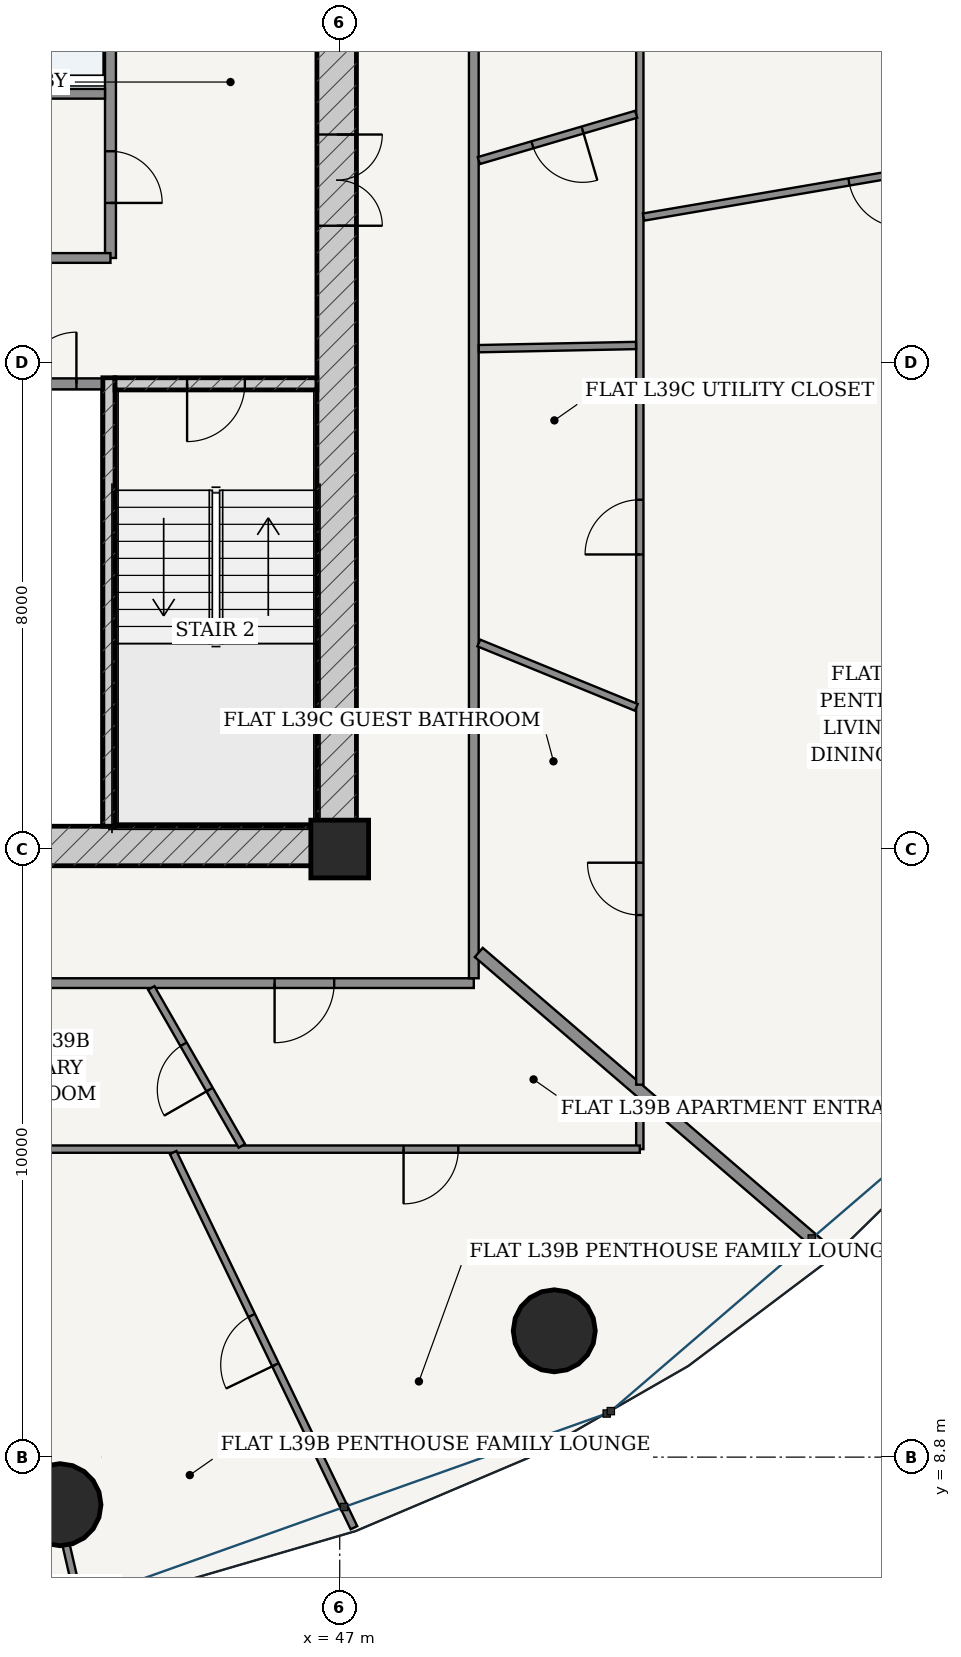
"""IFC4 building model, lengths in metres.
Left out: names, types, materials, properties, quantities, classifications, styles, units other than length and angle.
Written with IfcOpenShell. Run it as: python <this file> out.ifc"""

import sys

from ifc_helpers import new_model, si_unit, direction, frame, frame_2d, origin, origin_2d, place, context, subcontext, project, spatial, rectangle, hollow_circle, extrude, source, transform, mapped, element, fill, save


model = new_model("IFC4")
c1 = context("Model", 3, precision=1e-05, world=origin(), true_north=direction((-0.2419218956, 0.970295726276)))
c2 = subcontext(c1, "Body", "Model", "MODEL_VIEW")
j1 = project(units=[si_unit("LENGTHUNIT", "METRE"), si_unit("PLANEANGLEUNIT", "RADIAN")], contexts=[c1])
p1 = place(None, origin())
s1 = spatial("IfcSite", under=j1, at=p1, CompositionType="ELEMENT")
p2 = place(p1, origin())
s2 = spatial("IfcBuilding", under=s1, at=p2, CompositionType="ELEMENT")
p3 = place(p2, frame((0.0, 0.0, 149.8)))
s3 = spatial("IfcBuildingStorey", under=s2, at=p3, CompositionType="ELEMENT", Elevation=149.8)
p4 = place(p3, frame((47.0, 18.8, 0.0), z_axis=(0.0, 0.0, 1.0), x_axis=(1.0, 0.0, 0.0)))
e1 = element("IfcColumn", 1, at=p4, inside=s3, PredefinedType="COLUMN", context=c2, shape_type="SweptSolid", body=[
    extrude(rectangle(XDim=0.95, YDim=0.95, at=origin_2d()), origin(), (0.0, 0.0, 1.0), 3.6),
])
p5 = place(p3, frame((28.725, 18.85, 0.0), z_axis=(0.0, 0.0, 1.0), x_axis=(1.0, 0.0, 0.0)))
e2 = element("IfcWall", 2, at=p5, inside=s3, PredefinedType="SHEAR", context=c2, shape_type="SweptSolid", body=[
    extrude(rectangle(XDim=18.55, YDim=0.65, at=frame_2d((9.275, 0.0))), origin(), (0.0, 0.0, 1.0), 3.33),
])
p6 = place(p5, frame((7.51, 0.0, 0.0)))
e3 = element("IfcOpeningElement", 3, at=p6, cuts=e2, PredefinedType="OPENING", context=c2, shape_type="SweptSolid", body=[
    extrude(rectangle(XDim=0.85, YDim=2.1, at=frame_2d((0.425, 1.05))), frame((0.0, 0.335, 0.0), z_axis=(0.0, -1.0, 0.0), x_axis=(1.0, 0.0, 0.0)), (0.0, 0.0, 1.0), 0.67),
])
p7 = place(p5, frame((10.59, 0.0, 0.0)))
e4 = element("IfcOpeningElement", 4, at=p7, cuts=e2, PredefinedType="OPENING", context=c2, shape_type="SweptSolid", body=[
    extrude(rectangle(XDim=0.85, YDim=2.1, at=frame_2d((0.425, 1.05))), frame((0.0, 0.335, 0.0), z_axis=(0.0, -1.0, 0.0), x_axis=(1.0, 0.0, 0.0)), (0.0, 0.0, 1.0), 0.67),
])
p8 = place(p3, frame((46.95, 19.175, 0.0), z_axis=(0.0, 0.0, 1.0), x_axis=(0.0, 1.0, 0.0)))
e5 = element("IfcWall", 5, at=p8, inside=s3, PredefinedType="SHEAR", context=c2, shape_type="SweptSolid", body=[
    extrude(rectangle(XDim=15.25, YDim=0.65, at=frame_2d((7.625, 0.0))), origin(), (0.0, 0.0, 1.0), 3.33),
])
p9 = place(p8, frame((9.875, 0.0, 0.0)))
e6 = element("IfcOpeningElement", 6, at=p9, cuts=e5, PredefinedType="OPENING", context=c2, shape_type="SweptSolid", body=[
    extrude(rectangle(XDim=1.5, YDim=2.2, at=frame_2d((0.75, 1.1))), frame((0.0, 0.335, 0.0), z_axis=(0.0, -1.0, 0.0), x_axis=(1.0, 0.0, 0.0)), (0.0, 0.0, 1.0), 0.67),
])
p10 = place(p3, frame((43.205, 19.175, 0.0), z_axis=(0.0, 0.0, 1.0), x_axis=(0.0, 1.0, 0.0)))
e7 = element("IfcWall", 7, at=p10, inside=s3, PredefinedType="SOLIDWALL", context=c2, shape_type="SweptSolid", body=[
    extrude(rectangle(XDim=7.375, YDim=0.2, at=frame_2d((3.688, 0.0))), origin(), (0.0, 0.0, 1.0), 3.33),
])
p11 = place(p3, frame((43.305, 26.45, 0.0), z_axis=(0.0, 0.0, 1.0), x_axis=(1.0, 0.0, 0.0)))
e8 = element("IfcWall", 8, at=p11, inside=s3, PredefinedType="SOLIDWALL", context=c2, shape_type="SweptSolid", body=[
    extrude(rectangle(XDim=3.32, YDim=0.2, at=frame_2d((1.66, 0.0))), origin(), (0.0, 0.0, 1.0), 3.33),
])
p12 = place(p11, frame((1.185, 0.0, 0.0)))
e9 = element("IfcOpeningElement", 9, at=p12, cuts=e8, PredefinedType="OPENING", context=c2, shape_type="SweptSolid", body=[
    extrude(rectangle(XDim=0.95, YDim=2.15, at=frame_2d((0.475, 1.075))), frame((0.0, 0.11, 0.0), z_axis=(0.0, -1.0, 0.0), x_axis=(1.0, 0.0, 0.0)), (0.0, 0.0, 1.0), 0.22),
])
for number, where, z_axis, x_axis in (
    (10, (42.399, 8.018, 0.0), (0.0, 0.0, 1.0), (1.0, 0.0, 0.0)),
    (11, (50.528, 10.877, 0.0), (0.0, 0.0, 1.0), (1.0, 0.0, 0.0)),
):
    element("IfcColumn", number, at=place(p3, frame(where, z_axis=z_axis, x_axis=x_axis)), inside=s3, PredefinedType="COLUMN", context=c2, shape_type="SweptSolid", body=[
        extrude(hollow_circle(Radius=0.675, WallThickness=0.042, at=origin_2d()), origin(), (0.0, 0.0, 1.0), 3.6),
    ])
p13 = place(p3, frame((41.39, 26.45, 0.0), z_axis=(0.0, 0.0, 1.0), x_axis=(1.0, 0.0, 0.0)))
e12 = element("IfcWall", 12, at=p13, inside=s3, PredefinedType="PARTITIONING", context=c2, shape_type="SweptSolid", body=[
    extrude(rectangle(XDim=1.71, YDim=0.18, at=frame_2d((0.855, 0.0))), origin(), (0.0, 0.0, 1.0), 3.33),
])
p14 = place(p13, frame((0.43, 0.0, 0.0)))
e13 = element("IfcOpeningElement", 13, at=p14, cuts=e12, PredefinedType="OPENING", context=c2, shape_type="SweptSolid", body=[
    extrude(rectangle(XDim=0.85, YDim=2.1, at=frame_2d((0.425, 1.05))), frame((0.0, 0.1, 0.0), z_axis=(0.0, -1.0, 0.0), x_axis=(1.0, 0.0, 0.0)), (0.0, 0.0, 1.0), 0.2),
])
p15 = place(p3, frame((43.23, 28.52, 0.0), z_axis=(0.0, 0.0, 1.0), x_axis=(0.0, 1.0, 0.0)))
e14 = element("IfcWall", 14, at=p15, inside=s3, PredefinedType="PARTITIONING", context=c2, shape_type="SweptSolid", body=[
    extrude(rectangle(XDim=5.905, YDim=0.18, at=frame_2d((2.953, 0.0))), origin(), (0.0, 0.0, 1.0), 3.33),
])
p16 = place(p15, frame((0.905, 0.0, 0.0)))
e15 = element("IfcOpeningElement", 15, at=p16, cuts=e14, PredefinedType="OPENING", context=c2, shape_type="SweptSolid", body=[
    extrude(rectangle(XDim=0.85, YDim=2.1, at=frame_2d((0.425, 1.05))), frame((0.0, 0.1, 0.0), z_axis=(0.0, -1.0, 0.0), x_axis=(1.0, 0.0, 0.0)), (0.0, 0.0, 1.0), 0.2),
])
p17 = place(p15, frame((3.655, 0.0, 0.0)))
e16 = element("IfcOpeningElement", 16, at=p17, cuts=e14, PredefinedType="OPENING", context=c2, shape_type="SweptSolid", body=[
    extrude(rectangle(XDim=1.15, YDim=2.2, at=frame_2d((0.575, 1.1))), frame((0.0, 0.1, 0.0), z_axis=(0.0, -1.0, 0.0), x_axis=(1.0, 0.0, 0.0)), (0.0, 0.0, 1.0), 0.2),
])
p18 = place(p3, frame((41.39, 31.22, 0.0), z_axis=(0.0, 0.0, 1.0), x_axis=(1.0, 0.0, 0.0)))
e17 = element("IfcWall", 17, at=p18, inside=s3, PredefinedType="PARTITIONING", context=c2, shape_type="SweptSolid", body=[
    extrude(rectangle(XDim=1.75, YDim=0.16, at=frame_2d((0.875, 0.0))), origin(), (0.0, 0.0, 1.0), 3.33),
])
p19 = place(p3, frame((41.39, 28.52, 0.0), z_axis=(0.0, 0.0, 1.0), x_axis=(1.0, 0.0, 0.0)))
e18 = element("IfcWall", 18, at=p19, inside=s3, PredefinedType="PARTITIONING", context=c2, shape_type="SweptSolid", body=[
    extrude(rectangle(XDim=1.84, YDim=0.16, at=frame_2d((0.92, 0.0))), origin(), (0.0, 0.0, 1.0), 3.33),
])
p20 = place(p3, frame((34.32, 16.595, 0.0), z_axis=(0.0, 0.0, 1.0), x_axis=(1.0, 0.0, 0.0)))
e19 = element("IfcWall", 19, at=p20, inside=s3, PredefinedType="PARTITIONING", context=c2, shape_type="SweptSolid", body=[
    extrude(rectangle(XDim=14.885, YDim=0.16, at=frame_2d((7.442, 0.0))), origin(), (0.0, 0.0, 1.0), 2.776),
])
p21 = place(p20, frame((11.609, 0.0, 0.0)))
e20 = element("IfcOpeningElement", 20, at=p21, cuts=e19, PredefinedType="OPENING", context=c2, shape_type="SweptSolid", body=[
    extrude(rectangle(XDim=0.98, YDim=2.2, at=frame_2d((0.49, 1.1))), frame((0.0, 0.09, 0.0), z_axis=(0.0, -1.0, 0.0), x_axis=(1.0, 0.0, 0.0)), (0.0, 0.0, 1.0), 0.18),
])
p22 = place(p3, frame((49.205, 16.675, 0.0), z_axis=(0.0, 0.0, 1.0), x_axis=(0.0, 1.0, 0.0)))
e21 = element("IfcWall", 21, at=p22, inside=s3, PredefinedType="PARTITIONING", context=c2, shape_type="SweptSolid", body=[
    extrude(rectangle(XDim=18.4, YDim=0.16, at=frame_2d((9.2, 0.0))), origin(), (0.0, 0.0, 1.0), 2.776),
])
p23 = place(p22, frame((15.299, 0.0, 0.0)))
e22 = element("IfcOpeningElement", 22, at=p23, cuts=e21, PredefinedType="OPENING", context=c2, shape_type="SweptSolid", body=[
    extrude(rectangle(XDim=0.98, YDim=2.2, at=frame_2d((0.49, 1.1))), frame((0.0, 0.09, 0.0), z_axis=(0.0, -1.0, 0.0), x_axis=(1.0, 0.0, 0.0)), (0.0, 0.0, 1.0), 0.18),
])
p24 = place(p3, frame((51.935, 14.721, 0.0), z_axis=(0.0, 0.0, 1.0), x_axis=(0.0, -1.0, 0.0)))
e23 = element("IfcWall", 23, at=p24, inside=s3, PredefinedType="PARTITIONING", context=c2, shape_type="SweptSolid", body=[
    extrude(rectangle(XDim=0.856, YDim=0.12, at=frame_2d((0.428, 0.0))), origin(), (0.0, 0.0, 1.0), 3.33),
])
p25 = place(p3, frame((51.935, 13.865, 0.0), z_axis=(0.0, 0.0, 1.0), x_axis=(-1.0, 0.0, 0.0)))
e24 = element("IfcWall", 24, at=p25, inside=s3, PredefinedType="PARTITIONING", context=c2, shape_type="SweptSolid", body=[
    extrude(rectangle(XDim=20.345, YDim=0.12, at=frame_2d((10.172, 0.0))), origin(), (0.0, 0.0, 1.0), 2.776),
])
p26 = place(p25, frame((2.985, 0.0, 0.0)))
e25 = element("IfcOpeningElement", 25, at=p26, cuts=e24, PredefinedType="OPENING", context=c2, shape_type="SweptSolid", body=[
    extrude(rectangle(XDim=0.9, YDim=2.15, at=frame_2d((0.45, 1.075))), frame((0.0, 0.07, 0.0), z_axis=(0.0, -1.0, 0.0), x_axis=(1.0, 0.0, 0.0)), (0.0, 0.0, 1.0), 0.14),
])
p27 = place(p25, frame((12.333, 0.0, 0.0)))
e26 = element("IfcOpeningElement", 26, at=p27, cuts=e24, PredefinedType="OPENING", context=c2, shape_type="SweptSolid", body=[
    extrude(rectangle(XDim=0.9, YDim=2.15, at=frame_2d((0.45, 1.075))), frame((0.0, 0.07, 0.0), z_axis=(0.0, -1.0, 0.0), x_axis=(1.0, 0.0, 0.0)), (0.0, 0.0, 1.0), 0.14),
])
p28 = place(p25, frame((18.436, 0.0, 0.0)))
e27 = element("IfcOpeningElement", 27, at=p28, cuts=e24, PredefinedType="OPENING", context=c2, shape_type="SweptSolid", body=[
    extrude(rectangle(XDim=0.9, YDim=2.15, at=frame_2d((0.45, 1.075))), frame((0.0, 0.07, 0.0), z_axis=(0.0, -1.0, 0.0), x_axis=(1.0, 0.0, 0.0)), (0.0, 0.0, 1.0), 0.14),
])
p29 = place(p3, frame((41.008, 13.805, 0.0), z_axis=(0.0, 0.0, 1.0), x_axis=(0.225447000045, -0.974255433739, 0.0)))
e28 = element("IfcWall", 28, at=p29, inside=s3, PredefinedType="PARTITIONING", context=c2, shape_type="SweptSolid", body=[
    extrude(rectangle(XDim=7.496, YDim=0.12, at=frame_2d((3.748, 0.0))), origin(), (0.0, 0.0, 1.0), 2.776),
])
p30 = place(p29, frame((2.289, 0.0, 0.0)))
e29 = element("IfcOpeningElement", 29, at=p30, cuts=e28, PredefinedType="OPENING", context=c2, shape_type="SweptSolid", body=[
    extrude(rectangle(XDim=0.9, YDim=2.15, at=frame_2d((0.45, 1.075))), frame((0.0, 0.07, 0.0), z_axis=(0.0, -1.0, 0.0), x_axis=(1.0, 0.0, 0.0)), (0.0, 0.0, 1.0), 0.14),
])
p31 = place(p3, frame((44.26, 13.809, 0.0), z_axis=(0.0, 0.0, 1.0), x_axis=(0.434162832987, -0.900834410118, 0.0)))
e30 = element("IfcWall", 30, at=p31, inside=s3, PredefinedType="PARTITIONING", context=c2, shape_type="SweptSolid", body=[
    extrude(rectangle(XDim=6.849, YDim=0.12, at=frame_2d((3.425, 0.0))), origin(), (0.0, 0.0, 1.0), 2.846),
])
p32 = place(p31, frame((2.975, 0.0, 0.0)))
e31 = element("IfcOpeningElement", 31, at=p32, cuts=e30, PredefinedType="OPENING", context=c2, shape_type="SweptSolid", body=[
    extrude(rectangle(XDim=0.9, YDim=2.15, at=frame_2d((0.45, 1.075))), frame((0.0, 0.07, 0.0), z_axis=(0.0, -1.0, 0.0), x_axis=(1.0, 0.0, 0.0)), (0.0, 0.0, 1.0), 0.14),
])
p33 = place(p3, frame((43.901, 16.515, 0.0), z_axis=(0.0, 0.0, 1.0), x_axis=(0.497640283609, -0.86738350695, 0.0)))
e32 = element("IfcWall", 32, at=p33, inside=s3, PredefinedType="PARTITIONING", context=c2, shape_type="SweptSolid", body=[
    extrude(rectangle(XDim=2.993, YDim=0.12, at=frame_2d((1.497, 0.0))), origin(), (0.0, 0.0, 1.0), 3.005),
])
p34 = place(p33, frame((1.067, 0.0, 0.0)))
e33 = element("IfcOpeningElement", 33, at=p34, cuts=e32, PredefinedType="OPENING", context=c2, shape_type="SweptSolid", body=[
    extrude(rectangle(XDim=0.86, YDim=2.15, at=frame_2d((0.43, 1.075))), frame((0.0, 0.07, 0.0), z_axis=(0.0, -1.0, 0.0), x_axis=(1.0, 0.0, 0.0)), (0.0, 0.0, 1.0), 0.14),
])
p35 = place(p3, frame((49.287, 17.099, 0.0), z_axis=(0.0, 0.0, 1.0), x_axis=(0.758362300646, -0.651833276965, 0.0)))
e34 = element("IfcWall", 34, at=p35, inside=s3, PredefinedType="PARTITIONING", context=c2, shape_type="SweptSolid", body=[
    extrude(rectangle(XDim=7.618, YDim=0.2, at=frame_2d((3.809, 0.0))), origin(), (0.0, 0.0, 1.0), 2.846),
])
p36 = place(p3, frame((51.935, 37.885, 0.0), z_axis=(0.0, 0.0, 1.0), x_axis=(0.0, -1.0, 0.0)))
e35 = element("IfcWall", 35, at=p36, inside=s3, PredefinedType="PARTITIONING", context=c2, shape_type="SweptSolid", body=[
    extrude(rectangle(XDim=22.96, YDim=0.12, at=frame_2d((11.48, 0.0))), origin(), (0.0, 0.0, 1.0), 2.776),
])
p37 = place(p36, frame((4.61, 0.0, 0.0)))
e36 = element("IfcOpeningElement", 36, at=p37, cuts=e35, PredefinedType="OPENING", context=c2, shape_type="SweptSolid", body=[
    extrude(rectangle(XDim=0.9, YDim=2.15, at=frame_2d((0.45, 1.075))), frame((0.0, 0.07, 0.0), z_axis=(0.0, -1.0, 0.0), x_axis=(1.0, 0.0, 0.0)), (0.0, 0.0, 1.0), 0.14),
])
p38 = place(p36, frame((19.31, 0.0, 0.0)))
e37 = element("IfcOpeningElement", 37, at=p38, cuts=e35, PredefinedType="OPENING", context=c2, shape_type="SweptSolid", body=[
    extrude(rectangle(XDim=0.86, YDim=2.15, at=frame_2d((0.43, 1.075))), frame((0.0, 0.07, 0.0), z_axis=(0.0, -1.0, 0.0), x_axis=(1.0, 0.0, 0.0)), (0.0, 0.0, 1.0), 0.14),
])
p39 = place(p36, frame((13.341, 0.0, 0.0)))
e38 = element("IfcOpeningElement", 38, at=p39, cuts=e35, PredefinedType="OPENING", context=c2, shape_type="SweptSolid", body=[
    extrude(rectangle(XDim=0.9, YDim=2.15, at=frame_2d((0.45, 1.075))), frame((0.0, 0.07, 0.0), z_axis=(0.0, -1.0, 0.0), x_axis=(1.0, 0.0, 0.0)), (0.0, 0.0, 1.0), 0.14),
])
p40 = place(p3, frame((51.996, 29.193, 0.0), z_axis=(0.0, 0.0, 1.0), x_axis=(0.985698378271, 0.168519159369, 0.0)))
e39 = element("IfcWall", 39, at=p40, inside=s3, PredefinedType="PARTITIONING", context=c2, shape_type="SweptSolid", body=[
    extrude(rectangle(XDim=9.769, YDim=0.12, at=frame_2d((4.884, 0.0))), origin(), (0.0, 0.0, 1.0), 2.776),
])
p41 = place(p40, frame((3.428, 0.0, 0.0)))
e40 = element("IfcOpeningElement", 40, at=p41, cuts=e39, PredefinedType="OPENING", context=c2, shape_type="SweptSolid", body=[
    extrude(rectangle(XDim=0.9, YDim=2.15, at=frame_2d((0.45, 1.075))), frame((0.0, 0.07, 0.0), z_axis=(0.0, -1.0, 0.0), x_axis=(1.0, 0.0, 0.0)), (0.0, 0.0, 1.0), 0.14),
])
p42 = place(p3, frame((49.287, 22.188, 0.0), z_axis=(0.0, 0.0, 1.0), x_axis=(0.925708058909, -0.378238799796, 0.0)))
e41 = element("IfcWall", 41, at=p42, inside=s3, PredefinedType="PARTITIONING", context=c2, shape_type="SweptSolid", body=[
    extrude(rectangle(XDim=2.799, YDim=0.12, at=frame_2d((1.399, 0.0))), origin(), (0.0, 0.0, 1.0), 3.33),
])
p43 = place(p3, frame((49.287, 27.029, 0.0), z_axis=(0.0, 0.0, 1.0), x_axis=(0.999794052369, 0.020294157974, 0.0)))
e42 = element("IfcWall", 42, at=p43, inside=s3, PredefinedType="PARTITIONING", context=c2, shape_type="SweptSolid", body=[
    extrude(rectangle(XDim=2.586, YDim=0.12, at=frame_2d((1.293, 0.0))), origin(), (0.0, 0.0, 1.0), 3.33),
])
p44 = place(p3, frame((49.287, 30.121, 0.0), z_axis=(0.0, 0.0, 1.0), x_axis=(0.959304970846, 0.282372046969, 0.0)))
e43 = element("IfcWall", 43, at=p44, inside=s3, PredefinedType="PARTITIONING", context=c2, shape_type="SweptSolid", body=[
    extrude(rectangle(XDim=2.698, YDim=0.12, at=frame_2d((1.349, 0.0))), origin(), (0.0, 0.0, 1.0), 3.33),
])
p45 = place(p44, frame((0.919, 0.0, 0.0)))
e44 = element("IfcOpeningElement", 44, at=p45, cuts=e43, PredefinedType="OPENING", context=c2, shape_type="SweptSolid", body=[
    extrude(rectangle(XDim=0.86, YDim=2.15, at=frame_2d((0.43, 1.075))), frame((0.0, 0.07, 0.0), z_axis=(0.0, -1.0, 0.0), x_axis=(1.0, 0.0, 0.0)), (0.0, 0.0, 1.0), 0.14),
])
m1 = source(origin(), c2, "Body", "SweptSolid", [
    extrude(rectangle(XDim=1.5, YDim=2.2, at=frame_2d((0.75, 1.1))), frame((0.0, 0.025, 0.0), z_axis=(0.0, -1.0, 0.0), x_axis=(1.0, 0.0, 0.0)), (0.0, 0.0, 1.0), 0.05),
])
p46 = place(p9, frame((1.5, 0.0, 0.0), z_axis=(0.0, 0.0, 1.0), x_axis=(-1.0, 0.0, 0.0)))
e45 = element("IfcDoor", 45, at=p46, inside=s3, OperationType="DOUBLE_DOOR_SINGLE_SWING", PredefinedType="DOOR", context=c2, shape_type="MappedRepresentation", body=[
    mapped(m1, transform((0.0, 0.0, 0.0), scale=1.0)),
])
fill(e6, e45)
m2 = source(origin(), c2, "Body", "SweptSolid", [
    extrude(rectangle(XDim=0.95, YDim=2.15, at=frame_2d((0.475, 1.075))), frame((0.0, 0.025, 0.0), z_axis=(0.0, -1.0, 0.0), x_axis=(1.0, 0.0, 0.0)), (0.0, 0.0, 1.0), 0.05),
])
p47 = place(p12, frame((0.95, 0.0, 0.0), z_axis=(0.0, 0.0, 1.0), x_axis=(-1.0, 0.0, 0.0)))
e46 = element("IfcDoor", 46, at=p47, inside=s3, OperationType="SINGLE_SWING_RIGHT", PredefinedType="DOOR", context=c2, shape_type="MappedRepresentation", body=[
    mapped(m2, transform((0.0, 0.0, 0.0), scale=1.0)),
])
fill(e9, e46)
m3 = source(origin(), c2, "Body", "SweptSolid", [
    extrude(rectangle(XDim=0.85, YDim=2.1, at=frame_2d((0.425, 1.05))), frame((0.0, 0.025, 0.0), z_axis=(0.0, -1.0, 0.0), x_axis=(1.0, 0.0, 0.0)), (0.0, 0.0, 1.0), 0.05),
])
p48 = place(p14, origin())
e47 = element("IfcDoor", 47, at=p48, inside=s3, OperationType="SINGLE_SWING_RIGHT", PredefinedType="DOOR", context=c2, shape_type="MappedRepresentation", body=[
    mapped(m3, transform((0.0, 0.0, 0.0), scale=1.0)),
])
fill(e13, e47)
p49 = place(p16, frame((0.85, 0.0, 0.0), z_axis=(0.0, 0.0, 1.0), x_axis=(-1.0, 0.0, 0.0)))
e48 = element("IfcDoor", 48, at=p49, inside=s3, OperationType="SINGLE_SWING_RIGHT", PredefinedType="DOOR", context=c2, shape_type="MappedRepresentation", body=[
    mapped(m3, transform((0.0, 0.0, 0.0), scale=1.0)),
])
fill(e15, e48)
m4 = source(origin(), c2, "Body", "SweptSolid", [
    extrude(rectangle(XDim=0.98, YDim=2.2, at=frame_2d((0.49, 1.1))), frame((0.0, 0.025, 0.0), z_axis=(0.0, -1.0, 0.0), x_axis=(1.0, 0.0, 0.0)), (0.0, 0.0, 1.0), 0.05),
])
p50 = place(p21, frame((0.98, 0.0, 0.0), z_axis=(0.0, 0.0, 1.0), x_axis=(-1.0, 0.0, 0.0)))
e49 = element("IfcDoor", 49, at=p50, inside=s3, OperationType="SINGLE_SWING_RIGHT", PredefinedType="DOOR", context=c2, shape_type="MappedRepresentation", body=[
    mapped(m4, transform((0.0, 0.0, 0.0), scale=1.0)),
])
fill(e20, e49)
m5 = source(origin(), c2, "Body", "SweptSolid", [
    extrude(rectangle(XDim=0.86, YDim=2.15, at=frame_2d((0.43, 1.075))), frame((0.0, 0.025, 0.0), z_axis=(0.0, -1.0, 0.0), x_axis=(1.0, 0.0, 0.0)), (0.0, 0.0, 1.0), 0.05),
])
p51 = place(p34, frame((0.86, 0.0, 0.0), z_axis=(0.0, 0.0, 1.0), x_axis=(-1.0, 0.0, 0.0)))
e50 = element("IfcDoor", 50, at=p51, inside=s3, OperationType="SINGLE_SWING_LEFT", PredefinedType="DOOR", context=c2, shape_type="MappedRepresentation", body=[
    mapped(m5, transform((0.0, 0.0, 0.0), scale=1.0)),
])
fill(e33, e50)
m6 = source(origin(), c2, "Body", "SweptSolid", [
    extrude(rectangle(XDim=0.9, YDim=2.15, at=frame_2d((0.45, 1.075))), frame((0.0, 0.025, 0.0), z_axis=(0.0, -1.0, 0.0), x_axis=(1.0, 0.0, 0.0)), (0.0, 0.0, 1.0), 0.05),
])
p52 = place(p26, origin())
e51 = element("IfcDoor", 51, at=p52, inside=s3, OperationType="SINGLE_SWING_RIGHT", PredefinedType="DOOR", context=c2, shape_type="MappedRepresentation", body=[
    mapped(m6, transform((0.0, 0.0, 0.0), scale=1.0)),
])
fill(e25, e51)
p53 = place(p32, frame((0.9, 0.0, 0.0), z_axis=(0.0, 0.0, 1.0), x_axis=(-1.0, 0.0, 0.0)))
e52 = element("IfcDoor", 52, at=p53, inside=s3, OperationType="SINGLE_SWING_LEFT", PredefinedType="DOOR", context=c2, shape_type="MappedRepresentation", body=[
    mapped(m6, transform((0.0, 0.0, 0.0), scale=1.0)),
])
fill(e31, e52)
p54 = place(p45, frame((0.86, 0.0, 0.0), z_axis=(0.0, 0.0, 1.0), x_axis=(-1.0, 0.0, 0.0)))
e53 = element("IfcDoor", 53, at=p54, inside=s3, OperationType="SINGLE_SWING_LEFT", PredefinedType="DOOR", context=c2, shape_type="MappedRepresentation", body=[
    mapped(m5, transform((0.0, 0.0, 0.0), scale=1.0)),
])
fill(e44, e53)
p55 = place(p41, frame((0.9, 0.0, 0.0), z_axis=(0.0, 0.0, 1.0), x_axis=(-1.0, 0.0, 0.0)))
e54 = element("IfcDoor", 54, at=p55, inside=s3, OperationType="SINGLE_SWING_LEFT", PredefinedType="DOOR", context=c2, shape_type="MappedRepresentation", body=[
    mapped(m6, transform((0.0, 0.0, 0.0), scale=1.0)),
])
fill(e40, e54)
p56 = place(p38, frame((0.86, 0.0, 0.0), z_axis=(0.0, 0.0, 1.0), x_axis=(-1.0, 0.0, 0.0)))
e55 = element("IfcDoor", 55, at=p56, inside=s3, OperationType="SINGLE_SWING_RIGHT", PredefinedType="DOOR", context=c2, shape_type="MappedRepresentation", body=[
    mapped(m5, transform((0.0, 0.0, 0.0), scale=1.0)),
])
fill(e37, e55)
p57 = place(p39, frame((0.9, 0.0, 0.0), z_axis=(0.0, 0.0, 1.0), x_axis=(-1.0, 0.0, 0.0)))
e56 = element("IfcDoor", 56, at=p57, inside=s3, OperationType="SINGLE_SWING_LEFT", PredefinedType="DOOR", context=c2, shape_type="MappedRepresentation", body=[
    mapped(m6, transform((0.0, 0.0, 0.0), scale=1.0)),
])
fill(e38, e56)
save(model, sys.argv[1])
